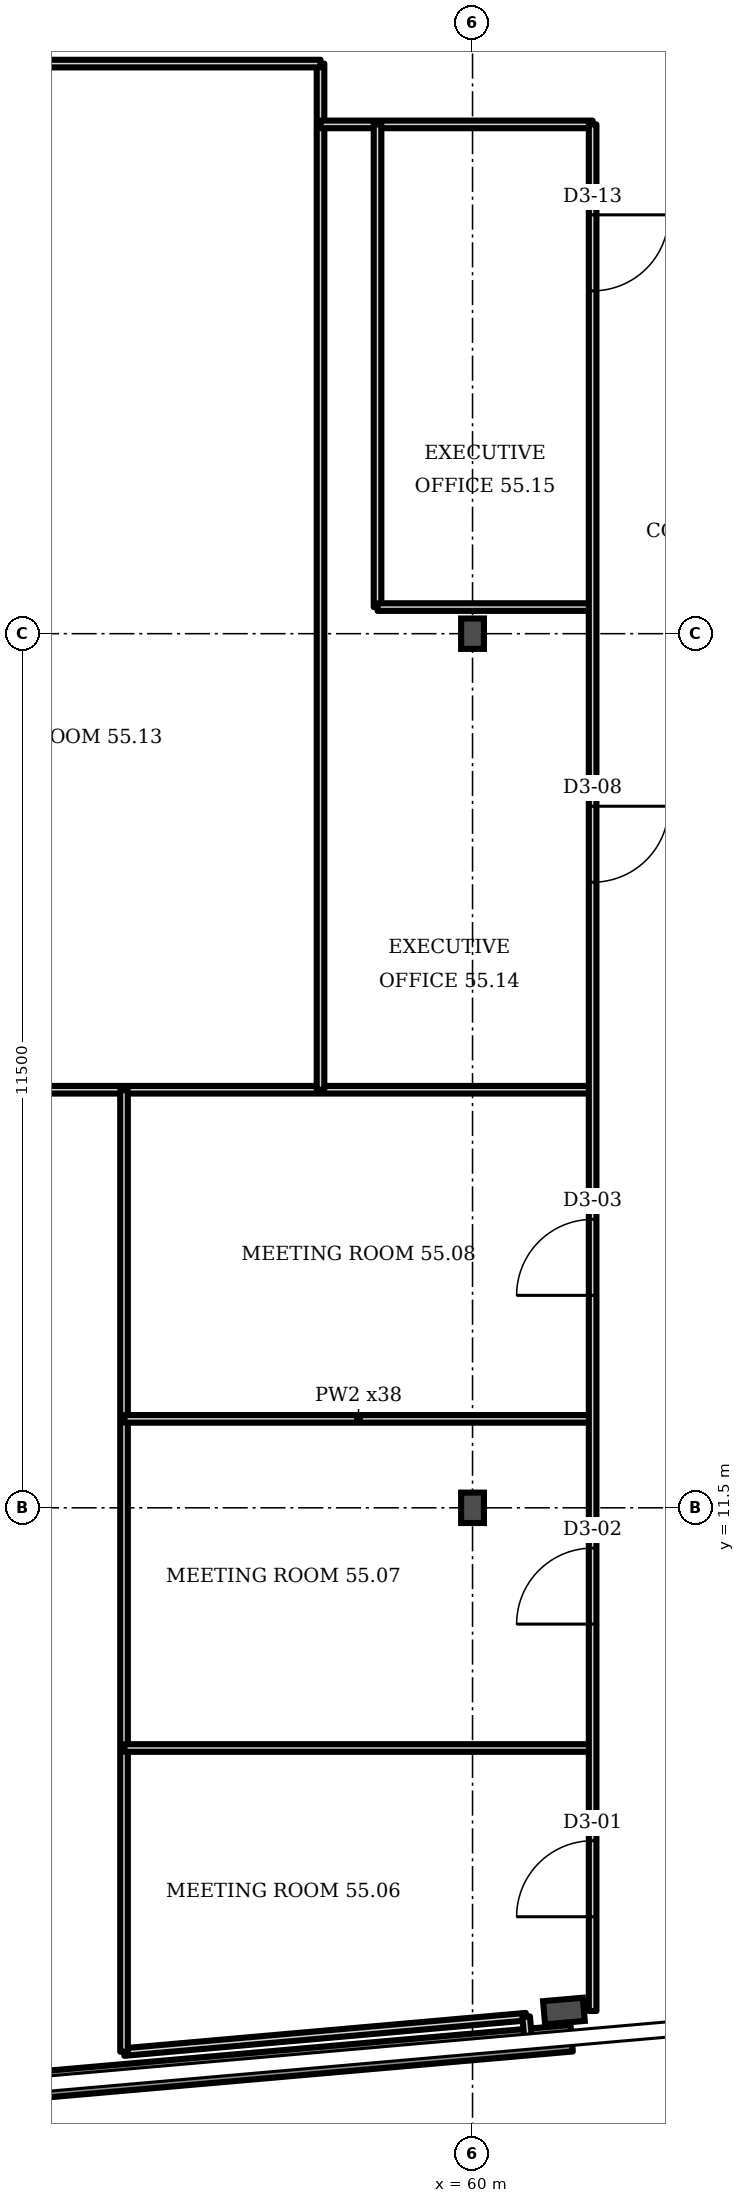
"""IFC4 building model, lengths in metres.
Left out: names, types, materials, properties, quantities, classifications, styles, units other than length and angle.
Written with IfcOpenShell. Run it as: python <this file> out.ifc"""

import sys

from ifc_helpers import new_model, si_unit, direction, frame, frame_2d, origin, origin_2d, place, context, subcontext, project, spatial, rectangle, i_section, extrude, element, fill, save


model = new_model("IFC4")
c1 = context("Model", 3, precision=1e-05, world=origin(), true_north=direction((0.0, 1.0)))
c2 = subcontext(c1, "Body", "Model", "MODEL_VIEW")
j1 = project(units=[si_unit("LENGTHUNIT", "METRE"), si_unit("PLANEANGLEUNIT", "RADIAN")], contexts=[c1])
p1 = place(None, origin())
s1 = spatial("IfcSite", under=j1, at=p1, CompositionType="ELEMENT")
p2 = place(p1, origin())
s2 = spatial("IfcBuilding", under=s1, at=p2, CompositionType="ELEMENT")
p3 = place(p2, frame((0.0, 0.0, 221.5)))
s3 = spatial("IfcBuildingStorey", under=s2, at=p3, CompositionType="ELEMENT", Elevation=221.5)
p4 = place(p3, frame((61.202, 4.879, 0.0), z_axis=(0.0, 0.0, 1.0), x_axis=(0.087156, -0.996197, 0.0)))
e1 = element("IfcColumn", 1, at=p4, inside=s3, PredefinedType="COLUMN", context=c2, shape_type="SweptSolid", body=[
    extrude(i_section(OverallWidth=0.306, OverallDepth=0.524, WebThickness=0.021, FlangeThickness=0.04, FilletRadius=0.027, at=origin_2d()), origin(), (0.0, 0.0, 1.0), 3.6),
])
for number, where, z_axis, x_axis in (
    (2, (60.0, 11.5, 0.0), (0.0, 0.0, 1.0), (1.0, 0.0, 0.0)),
    (3, (60.0, 23.0, 0.0), (0.0, 0.0, 1.0), (1.0, 0.0, 0.0)),
):
    element("IfcColumn", number, at=place(p3, frame(where, z_axis=z_axis, x_axis=x_axis)), inside=s3, PredefinedType="COLUMN", context=c2, shape_type="SweptSolid", body=[
        extrude(i_section(OverallWidth=0.3, OverallDepth=0.4, WebThickness=0.013, FlangeThickness=0.024, FilletRadius=0.027, at=origin_2d()), origin(), (0.0, 0.0, 1.0), 3.6),
    ])
p5 = place(p3, frame((49.545, 3.493, 0.0), z_axis=(0.0, 0.0, 1.0), x_axis=(0.996196, 0.087141, 0.0)))
e4 = element("IfcWall", 4, at=p5, inside=s3, PredefinedType="SOLIDWALL", context=c2, shape_type="SweptSolid", body=[
    extrude(rectangle(XDim=11.803, YDim=0.35, at=frame_2d((5.902, 0.0))), origin(), (0.0, 0.0, 1.0), 1.0),
])
p6 = place(p3, frame((39.04, 17.0, 0.0), z_axis=(0.0, 0.0, 1.0), x_axis=(1.0, 0.0, 0.0)))
e5 = element("IfcWall", 5, at=p6, inside=s3, PredefinedType="PARTITIONING", context=c2, shape_type="SweptSolid", body=[
    extrude(rectangle(XDim=22.54, YDim=0.1, at=frame_2d((11.27, 0.0))), origin(), (0.0, 0.0, 1.0), 3.2),
])
p7 = place(p3, frame((55.415, 4.34, 0.0), z_axis=(0.0, 0.0, 1.0), x_axis=(0.996159, 0.087534, 0.0)))
e6 = element("IfcWall", 6, at=p7, inside=s3, PredefinedType="PARTITIONING", context=c2, shape_type="SweptSolid", body=[
    extrude(rectangle(XDim=5.31, YDim=0.1, at=frame_2d((2.655, 0.0))), origin(), (0.0, 0.0, 1.0), 2.58),
])
p8 = place(p3, frame((55.415, 4.345, 0.0), z_axis=(0.0, 0.0, 1.0), x_axis=(0.0, 1.0, 0.0)))
e7 = element("IfcWall", 7, at=p8, inside=s3, PredefinedType="PARTITIONING", context=c2, shape_type="SweptSolid", body=[
    extrude(rectangle(XDim=12.65, YDim=0.1, at=frame_2d((6.325, 0.0))), origin(), (0.0, 0.0, 1.0), 3.2),
])
for number, where, z_axis, x_axis in (
    (8, (55.42, 8.34, 0.0), (0.0, 0.0, 1.0), (1.0, 0.0, 0.0)),
    (9, (55.42, 12.67, 0.0), (0.0, 0.0, 1.0), (1.0, 0.0, 0.0)),
):
    element("IfcWall", number, at=place(p3, frame(where, z_axis=z_axis, x_axis=x_axis)), inside=s3, PredefinedType="PARTITIONING", context=c2, shape_type="SweptSolid", body=[
        extrude(rectangle(XDim=6.16, YDim=0.1, at=frame_2d((3.08, 0.0))), origin(), (0.0, 0.0, 1.0), 3.2),
    ])
p9 = place(p3, frame((58.0, 17.0, 0.0), z_axis=(0.0, 0.0, 1.0), x_axis=(0.0, 1.0, 0.0)))
e10 = element("IfcWall", 10, at=p9, inside=s3, PredefinedType="PARTITIONING", context=c2, shape_type="SweptSolid", body=[
    extrude(rectangle(XDim=13.5, YDim=0.1, at=frame_2d((6.75, 0.0))), origin(), (0.0, 0.0, 1.0), 3.2),
])
p10 = place(p3, frame((58.0, 29.7, 0.0), z_axis=(0.0, 0.0, 1.0), x_axis=(1.0, 0.0, 0.0)))
e11 = element("IfcWall", 11, at=p10, inside=s3, PredefinedType="PARTITIONING", context=c2, shape_type="SweptSolid", body=[
    extrude(rectangle(XDim=3.58, YDim=0.1, at=frame_2d((1.79, 0.0))), origin(), (0.0, 0.0, 1.0), 3.2),
])
p11 = place(p3, frame((58.75, 23.35, 0.0), z_axis=(0.0, 0.0, 1.0), x_axis=(0.0, 1.0, 0.0)))
e12 = element("IfcWall", 12, at=p11, inside=s3, PredefinedType="PARTITIONING", context=c2, shape_type="SweptSolid", body=[
    extrude(rectangle(XDim=6.35, YDim=0.1, at=frame_2d((3.175, 0.0))), origin(), (0.0, 0.0, 1.0), 3.2),
])
p12 = place(p3, frame((58.75, 23.35, 0.0), z_axis=(0.0, 0.0, 1.0), x_axis=(1.0, 0.0, 0.0)))
e13 = element("IfcWall", 13, at=p12, inside=s3, PredefinedType="PARTITIONING", context=c2, shape_type="SweptSolid", body=[
    extrude(rectangle(XDim=2.83, YDim=0.1, at=frame_2d((1.415, 0.0))), origin(), (0.0, 0.0, 1.0), 3.2),
])
p13 = place(p3, frame((60.733, 4.497, 0.0), z_axis=(0.0, 0.0, 1.0), x_axis=(-0.090037, 0.995936, 0.0)))
e14 = element("IfcWall", 14, at=p13, inside=s3, PredefinedType="PARTITIONING", context=c2, shape_type="SweptSolid", body=[
    extrude(rectangle(XDim=0.309, YDim=0.1, at=frame_2d((0.155, 0.0))), origin(), (0.0, 0.0, 1.0), 3.2),
])
p14 = place(p3, frame((61.58, 4.88, 0.0), z_axis=(0.0, 0.0, 1.0), x_axis=(0.0, 1.0, 0.0)))
e15 = element("IfcWall", 15, at=p14, inside=s3, PredefinedType="PARTITIONING", context=c2, shape_type="SweptSolid", body=[
    extrude(rectangle(XDim=24.82, YDim=0.1, at=frame_2d((12.41, 0.0))), origin(), (0.0, 0.0, 1.0), 3.2),
])
p15 = place(p14, frame((1.24, 0.0, 0.0)))
e16 = element("IfcOpeningElement", 16, at=p15, cuts=e15, PredefinedType="OPENING", context=c2, shape_type="SweptSolid", body=[
    extrude(rectangle(XDim=1.0, YDim=2.1, at=frame_2d((0.5, 1.05))), frame((0.0, 0.06, 0.0), z_axis=(0.0, -1.0, 0.0), x_axis=(1.0, 0.0, 0.0)), (0.0, 0.0, 1.0), 0.12),
])
p16 = place(p14, frame((5.09, 0.0, 0.0)))
e17 = element("IfcOpeningElement", 17, at=p16, cuts=e15, PredefinedType="OPENING", context=c2, shape_type="SweptSolid", body=[
    extrude(rectangle(XDim=1.0, YDim=2.1, at=frame_2d((0.5, 1.05))), frame((0.0, 0.06, 0.0), z_axis=(0.0, -1.0, 0.0), x_axis=(1.0, 0.0, 0.0)), (0.0, 0.0, 1.0), 0.12),
])
p17 = place(p14, frame((9.415, 0.0, 0.0)))
e18 = element("IfcOpeningElement", 18, at=p17, cuts=e15, PredefinedType="OPENING", context=c2, shape_type="SweptSolid", body=[
    extrude(rectangle(XDim=1.0, YDim=2.1, at=frame_2d((0.5, 1.05))), frame((0.0, 0.06, 0.0), z_axis=(0.0, -1.0, 0.0), x_axis=(1.0, 0.0, 0.0)), (0.0, 0.0, 1.0), 0.12),
])
p18 = place(p14, frame((14.85, 0.0, 0.0)))
e19 = element("IfcOpeningElement", 19, at=p18, cuts=e15, PredefinedType="OPENING", context=c2, shape_type="SweptSolid", body=[
    extrude(rectangle(XDim=1.0, YDim=2.1, at=frame_2d((0.5, 1.05))), frame((0.0, 0.06, 0.0), z_axis=(0.0, -1.0, 0.0), x_axis=(1.0, 0.0, 0.0)), (0.0, 0.0, 1.0), 0.12),
])
p19 = place(p14, frame((22.63, 0.0, 0.0)))
e20 = element("IfcOpeningElement", 20, at=p19, cuts=e15, PredefinedType="OPENING", context=c2, shape_type="SweptSolid", body=[
    extrude(rectangle(XDim=1.0, YDim=2.1, at=frame_2d((0.5, 1.05))), frame((0.0, 0.06, 0.0), z_axis=(0.0, -1.0, 0.0), x_axis=(1.0, 0.0, 0.0)), (0.0, 0.0, 1.0), 0.12),
])
p20 = place(p3, frame((44.15, 30.5, 0.0), z_axis=(0.0, 0.0, 1.0), x_axis=(1.0, 0.0, 0.0)))
e21 = element("IfcWall", 21, at=p20, inside=s3, PredefinedType="PARTITIONING", context=c2, shape_type="SweptSolid", body=[
    extrude(rectangle(XDim=13.85, YDim=0.1, at=frame_2d((6.925, 0.0))), origin(), (0.0, 0.0, 1.0), 3.2),
])
p21 = place(p20, frame((6.77, 0.0, 0.0)))
e22 = element("IfcOpeningElement", 22, at=p21, cuts=e21, PredefinedType="OPENING", context=c2, shape_type="SweptSolid", body=[
    extrude(rectangle(XDim=1.0, YDim=2.1, at=frame_2d((0.5, 1.05))), frame((0.0, 0.06, 0.0), z_axis=(0.0, -1.0, 0.0), x_axis=(1.0, 0.0, 0.0)), (0.0, 0.0, 1.0), 0.12),
])
p22 = place(p15, origin())
e23 = element("IfcDoor", 23, at=p22, inside=s3, OperationType="SINGLE_SWING_LEFT", PredefinedType="DOOR", context=c2, shape_type="SweptSolid", body=[
    extrude(rectangle(XDim=1.0, YDim=2.1, at=frame_2d((0.5, 1.05))), frame((0.0, 0.025, 0.0), z_axis=(0.0, -1.0, 0.0), x_axis=(1.0, 0.0, 0.0)), (0.0, 0.0, 1.0), 0.05),
])
fill(e16, e23)
p23 = place(p16, origin())
e24 = element("IfcDoor", 24, at=p23, inside=s3, OperationType="SINGLE_SWING_LEFT", PredefinedType="DOOR", context=c2, shape_type="SweptSolid", body=[
    extrude(rectangle(XDim=1.0, YDim=2.1, at=frame_2d((0.5, 1.05))), frame((0.0, 0.025, 0.0), z_axis=(0.0, -1.0, 0.0), x_axis=(1.0, 0.0, 0.0)), (0.0, 0.0, 1.0), 0.05),
])
fill(e17, e24)
p24 = place(p17, origin())
e25 = element("IfcDoor", 25, at=p24, inside=s3, OperationType="SINGLE_SWING_LEFT", PredefinedType="DOOR", context=c2, shape_type="SweptSolid", body=[
    extrude(rectangle(XDim=1.0, YDim=2.1, at=frame_2d((0.5, 1.05))), frame((0.0, 0.025, 0.0), z_axis=(0.0, -1.0, 0.0), x_axis=(1.0, 0.0, 0.0)), (0.0, 0.0, 1.0), 0.05),
])
fill(e18, e25)
p25 = place(p18, origin())
e26 = element("IfcDoor", 26, at=p25, inside=s3, OperationType="SINGLE_SWING_RIGHT", PredefinedType="DOOR", context=c2, shape_type="SweptSolid", body=[
    extrude(rectangle(XDim=1.0, YDim=2.1, at=frame_2d((0.5, 1.05))), frame((0.0, 0.025, 0.0), z_axis=(0.0, -1.0, 0.0), x_axis=(1.0, 0.0, 0.0)), (0.0, 0.0, 1.0), 0.05),
])
fill(e19, e26)
p26 = place(p19, origin())
e27 = element("IfcDoor", 27, at=p26, inside=s3, OperationType="SINGLE_SWING_RIGHT", PredefinedType="DOOR", context=c2, shape_type="SweptSolid", body=[
    extrude(rectangle(XDim=1.0, YDim=2.1, at=frame_2d((0.5, 1.05))), frame((0.0, 0.025, 0.0), z_axis=(0.0, -1.0, 0.0), x_axis=(1.0, 0.0, 0.0)), (0.0, 0.0, 1.0), 0.05),
])
fill(e20, e27)
save(model, sys.argv[1])
